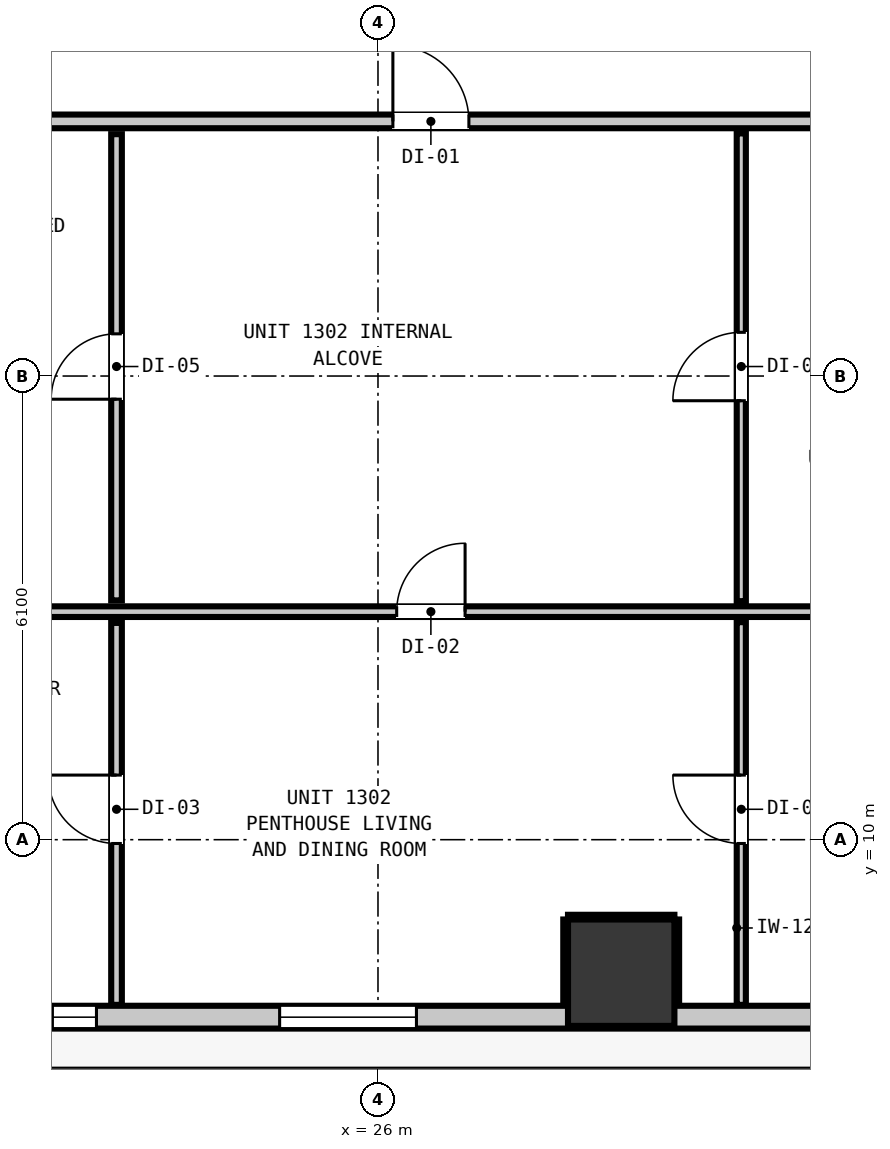
"""IFC4 building model, lengths in metres.
Left out: names, types, materials, properties, quantities, classifications, styles, units other than length and angle.
Written with IfcOpenShell. Run it as: python <this file> out.ifc"""

import sys

from ifc_helpers import new_model, si_unit, direction, frame, frame_2d, origin, origin_2d, place, context, subcontext, project, spatial, rectangle, extrude, element, fill, save


model = new_model("IFC4")
c1 = context("Model", 3, precision=1e-05, world=origin(), true_north=direction((0.0, 1.0)))
c2 = subcontext(c1, "Body", "Model", "MODEL_VIEW")
j1 = project(units=[si_unit("LENGTHUNIT", "METRE"), si_unit("PLANEANGLEUNIT", "RADIAN")], contexts=[c1])
p1 = place(None, origin())
s1 = spatial("IfcSite", under=j1, at=p1, CompositionType="ELEMENT")
p2 = place(p1, origin())
s2 = spatial("IfcBuilding", under=s1, at=p2, CompositionType="ELEMENT")
p3 = place(p2, frame((0.0, 0.0, 48.56)))
s3 = spatial("IfcBuildingStorey", under=s2, at=p3, CompositionType="ELEMENT", Elevation=48.56)
p4 = place(p3, frame((29.2, 8.25, 0.0), z_axis=(0.0, 0.0, 1.0), x_axis=(1.0, 0.0, 0.0)))
e1 = element("IfcColumn", 1, at=p4, inside=s3, PredefinedType="COLUMN", context=c2, shape_type="SweptSolid", body=[
    extrude(rectangle(XDim=1.4, YDim=1.4, at=origin_2d()), origin(), (0.0, 0.0, 1.0), 3.32),
])
p5 = place(p3, frame((47.835, 7.665, 0.0), z_axis=(0.0, 0.0, 1.0), x_axis=(-1.0, 0.0, 0.0)))
e2 = element("IfcWall", 2, at=p5, inside=s3, PredefinedType="STANDARD", context=c2, shape_type="SweptSolid", body=[
    extrude(rectangle(XDim=37.47, YDim=0.3, at=frame_2d((18.735, 0.0))), origin(), (0.0, 0.0, 1.0), 3.06),
])
p6 = place(p5, frame((2.301, 0.0, 0.0)))
e3 = element("IfcOpeningElement", 3, at=p6, cuts=e2, PredefinedType="OPENING", context=c2, shape_type="SweptSolid", body=[
    extrude(rectangle(XDim=1.0, YDim=2.15, at=frame_2d((0.5, 1.075))), frame((0.0, 0.16, 0.0), z_axis=(0.0, -1.0, 0.0), x_axis=(1.0, 0.0, 0.0)), (0.0, 0.0, 1.0), 0.32),
])
p7 = place(p5, frame((32.251, 0.0, 0.85)))
e4 = element("IfcOpeningElement", 4, at=p7, cuts=e2, PredefinedType="OPENING", context=c2, shape_type="SweptSolid", body=[
    extrude(rectangle(XDim=1.05, YDim=1.65, at=frame_2d((0.525, 0.825))), frame((0.0, 0.16, 0.0), z_axis=(0.0, -1.0, 0.0), x_axis=(1.0, 0.0, 0.0)), (0.0, 0.0, 1.0), 0.32),
])
p8 = place(p5, frame((21.329, 0.0, 0.85)))
e5 = element("IfcOpeningElement", 5, at=p8, cuts=e2, PredefinedType="OPENING", context=c2, shape_type="SweptSolid", body=[
    extrude(rectangle(XDim=1.8, YDim=1.9, at=frame_2d((0.9, 0.95))), frame((0.0, 0.16, 0.0), z_axis=(0.0, -1.0, 0.0), x_axis=(1.0, 0.0, 0.0)), (0.0, 0.0, 1.0), 0.32),
])
p9 = place(p5, frame((25.539, 0.0, 0.85)))
e6 = element("IfcOpeningElement", 6, at=p9, cuts=e2, PredefinedType="OPENING", context=c2, shape_type="SweptSolid", body=[
    extrude(rectangle(XDim=0.58, YDim=1.5, at=frame_2d((0.29, 0.75))), frame((0.0, 0.16, 0.0), z_axis=(0.0, -1.0, 0.0), x_axis=(1.0, 0.0, 0.0)), (0.0, 0.0, 1.0), 0.32),
])
p10 = place(p5, frame((14.135, 0.0, 0.85)))
e7 = element("IfcOpeningElement", 7, at=p10, cuts=e2, PredefinedType="OPENING", context=c2, shape_type="SweptSolid", body=[
    extrude(rectangle(XDim=1.8, YDim=1.9, at=frame_2d((0.9, 0.95))), frame((0.0, 0.16, 0.0), z_axis=(0.0, -1.0, 0.0), x_axis=(1.0, 0.0, 0.0)), (0.0, 0.0, 1.0), 0.32),
])
p11 = place(p5, frame((5.562, 0.0, 0.85)))
e8 = element("IfcOpeningElement", 8, at=p11, cuts=e2, PredefinedType="OPENING", context=c2, shape_type="SweptSolid", body=[
    extrude(rectangle(XDim=1.8, YDim=1.9, at=frame_2d((0.9, 0.95))), frame((0.0, 0.16, 0.0), z_axis=(0.0, -1.0, 0.0), x_axis=(1.0, 0.0, 0.0)), (0.0, 0.0, 1.0), 0.32),
])
p12 = place(p5, frame((9.839, 0.0, 0.85)))
e9 = element("IfcOpeningElement", 9, at=p12, cuts=e2, PredefinedType="OPENING", context=c2, shape_type="SweptSolid", body=[
    extrude(rectangle(XDim=0.58, YDim=1.5, at=frame_2d((0.29, 0.75))), frame((0.0, 0.16, 0.0), z_axis=(0.0, -1.0, 0.0), x_axis=(1.0, 0.0, 0.0)), (0.0, 0.0, 1.0), 0.32),
])
p13 = place(p5, frame((0.364, 0.0, 0.85)))
e10 = element("IfcOpeningElement", 10, at=p13, cuts=e2, PredefinedType="OPENING", context=c2, shape_type="SweptSolid", body=[
    extrude(rectangle(XDim=1.05, YDim=1.65, at=frame_2d((0.525, 0.825))), frame((0.0, 0.16, 0.0), z_axis=(0.0, -1.0, 0.0), x_axis=(1.0, 0.0, 0.0)), (0.0, 0.0, 1.0), 0.32),
])
p14 = place(p3, frame((8.027, 19.45, 0.0), z_axis=(0.0, 0.0, 1.0), x_axis=(1.0, 0.0, 0.0)))
e11 = element("IfcWall", 11, at=p14, inside=s3, PredefinedType="PARTITIONING", context=c2, shape_type="SweptSolid", body=[
    extrude(rectangle(XDim=42.146, YDim=0.18, at=frame_2d((21.073, 0.0))), origin(), (0.0, 0.0, 1.0), 3.06),
])
p15 = place(p14, frame((5.256, 0.0, 0.0)))
e12 = element("IfcOpeningElement", 12, at=p15, cuts=e11, PredefinedType="OPENING", context=c2, shape_type="SweptSolid", body=[
    extrude(rectangle(XDim=1.0, YDim=2.15, at=frame_2d((0.5, 1.075))), frame((0.0, 0.1, 0.0), z_axis=(0.0, -1.0, 0.0), x_axis=(1.0, 0.0, 0.0)), (0.0, 0.0, 1.0), 0.2),
])
p16 = place(p14, frame((18.169, 0.0, 0.0)))
e13 = element("IfcOpeningElement", 13, at=p16, cuts=e11, PredefinedType="OPENING", context=c2, shape_type="SweptSolid", body=[
    extrude(rectangle(XDim=1.0, YDim=2.15, at=frame_2d((0.5, 1.075))), frame((0.0, 0.1, 0.0), z_axis=(0.0, -1.0, 0.0), x_axis=(1.0, 0.0, 0.0)), (0.0, 0.0, 1.0), 0.2),
])
p17 = place(p14, frame((33.653, 0.0, 0.0)))
e14 = element("IfcOpeningElement", 14, at=p17, cuts=e11, PredefinedType="OPENING", context=c2, shape_type="SweptSolid", body=[
    extrude(rectangle(XDim=1.0, YDim=2.15, at=frame_2d((0.5, 1.075))), frame((0.0, 0.1, 0.0), z_axis=(0.0, -1.0, 0.0), x_axis=(1.0, 0.0, 0.0)), (0.0, 0.0, 1.0), 0.2),
])
p18 = place(p3, frame((19.12, 13.0, 0.0), z_axis=(0.0, 0.0, 1.0), x_axis=(1.0, 0.0, 0.0)))
e15 = element("IfcWall", 15, at=p18, inside=s3, PredefinedType="PARTITIONING", context=c2, shape_type="SweptSolid", body=[
    extrude(rectangle(XDim=31.053, YDim=0.14, at=frame_2d((15.526, 0.0))), origin(), (0.0, 0.0, 1.0), 3.06),
])
p19 = place(p18, frame((7.126, 0.0, 0.0)))
e16 = element("IfcOpeningElement", 16, at=p19, cuts=e15, PredefinedType="OPENING", context=c2, shape_type="SweptSolid", body=[
    extrude(rectangle(XDim=0.9, YDim=2.1, at=frame_2d((0.45, 1.05))), frame((0.0, 0.08, 0.0), z_axis=(0.0, -1.0, 0.0), x_axis=(1.0, 0.0, 0.0)), (0.0, 0.0, 1.0), 0.16),
])
p20 = place(p18, frame((22.609, 0.0, 0.0)))
e17 = element("IfcOpeningElement", 17, at=p20, cuts=e15, PredefinedType="OPENING", context=c2, shape_type="SweptSolid", body=[
    extrude(rectangle(XDim=0.9, YDim=2.1, at=frame_2d((0.45, 1.05))), frame((0.0, 0.08, 0.0), z_axis=(0.0, -1.0, 0.0), x_axis=(1.0, 0.0, 0.0)), (0.0, 0.0, 1.0), 0.16),
])
p21 = place(p3, frame((22.56, 7.827, 0.0), z_axis=(0.0, 0.0, 1.0), x_axis=(0.0, 1.0, 0.0)))
e18 = element("IfcWall", 18, at=p21, inside=s3, PredefinedType="PARTITIONING", context=c2, shape_type="SweptSolid", body=[
    extrude(rectangle(XDim=5.025, YDim=0.14, at=frame_2d((2.513, 0.0))), origin(), (0.0, 0.0, 1.0), 3.06),
])
p22 = place(p21, frame((2.123, 0.0, 0.0)))
e19 = element("IfcOpeningElement", 19, at=p22, cuts=e18, PredefinedType="OPENING", context=c2, shape_type="SweptSolid", body=[
    extrude(rectangle(XDim=0.9, YDim=2.1, at=frame_2d((0.45, 1.05))), frame((0.0, 0.08, 0.0), z_axis=(0.0, -1.0, 0.0), x_axis=(1.0, 0.0, 0.0)), (0.0, 0.0, 1.0), 0.16),
])
p23 = place(p3, frame((22.56, 13.148, 0.0), z_axis=(0.0, 0.0, 1.0), x_axis=(0.0, 1.0, 0.0)))
e20 = element("IfcWall", 20, at=p23, inside=s3, PredefinedType="PARTITIONING", context=c2, shape_type="SweptSolid", body=[
    extrude(rectangle(XDim=6.134, YDim=0.14, at=frame_2d((3.067, 0.0))), origin(), (0.0, 0.0, 1.0), 3.06),
])
p24 = place(p23, frame((2.647, 0.0, 0.0)))
e21 = element("IfcOpeningElement", 21, at=p24, cuts=e20, PredefinedType="OPENING", context=c2, shape_type="SweptSolid", body=[
    extrude(rectangle(XDim=0.86, YDim=2.02, at=frame_2d((0.43, 1.01))), frame((0.0, 0.08, 0.0), z_axis=(0.0, -1.0, 0.0), x_axis=(1.0, 0.0, 0.0)), (0.0, 0.0, 1.0), 0.16),
])
p25 = place(p3, frame((30.78, 7.827, 0.0), z_axis=(0.0, 0.0, 1.0), x_axis=(0.0, 1.0, 0.0)))
e22 = element("IfcWall", 22, at=p25, inside=s3, PredefinedType="PARTITIONING", context=c2, shape_type="SweptSolid", body=[
    extrude(rectangle(XDim=5.035, YDim=0.12, at=frame_2d((2.518, 0.0))), origin(), (0.0, 0.0, 1.0), 3.06),
])
p26 = place(p25, frame((2.123, 0.0, 0.0)))
e23 = element("IfcOpeningElement", 23, at=p26, cuts=e22, PredefinedType="OPENING", context=c2, shape_type="SweptSolid", body=[
    extrude(rectangle(XDim=0.9, YDim=2.1, at=frame_2d((0.45, 1.05))), frame((0.0, 0.07, 0.0), z_axis=(0.0, -1.0, 0.0), x_axis=(1.0, 0.0, 0.0)), (0.0, 0.0, 1.0), 0.14),
])
p27 = place(p3, frame((30.78, 13.138, 0.0), z_axis=(0.0, 0.0, 1.0), x_axis=(0.0, 1.0, 0.0)))
e24 = element("IfcWall", 24, at=p27, inside=s3, PredefinedType="PARTITIONING", context=c2, shape_type="SweptSolid", body=[
    extrude(rectangle(XDim=6.154, YDim=0.12, at=frame_2d((3.077, 0.0))), origin(), (0.0, 0.0, 1.0), 3.06),
])
p28 = place(p27, frame((2.637, 0.0, 0.0)))
e25 = element("IfcOpeningElement", 25, at=p28, cuts=e24, PredefinedType="OPENING", context=c2, shape_type="SweptSolid", body=[
    extrude(rectangle(XDim=0.9, YDim=2.1, at=frame_2d((0.45, 1.05))), frame((0.0, 0.07, 0.0), z_axis=(0.0, -1.0, 0.0), x_axis=(1.0, 0.0, 0.0)), (0.0, 0.0, 1.0), 0.14),
])
p29 = place(p3, frame((28.5, 8.982, 0.0), z_axis=(0.0, 0.0, 1.0), x_axis=(1.0, 0.0, 0.0)))
e26 = element("IfcWall", 26, at=p29, inside=s3, PredefinedType="PARTITIONING", context=c2, shape_type="SweptSolid", body=[
    extrude(rectangle(XDim=1.4, YDim=0.06, at=frame_2d((0.7, 0.0))), origin(), (0.0, 0.0, 1.0), 1.45),
])
for number, where, z_axis, x_axis in (
    (27, (28.468, 7.83, 0.0), (0.0, 0.0, 1.0), (0.0, 1.0, 0.0)),
    (28, (29.932, 7.83, 0.0), (0.0, 0.0, 1.0), (0.0, 1.0, 0.0)),
):
    element("IfcWall", number, at=place(p3, frame(where, z_axis=z_axis, x_axis=x_axis)), inside=s3, PredefinedType="PARTITIONING", context=c2, shape_type="SweptSolid", body=[
        extrude(rectangle(XDim=1.12, YDim=0.06, at=frame_2d((0.56, 0.0))), origin(), (0.0, 0.0, 1.0), 1.45),
    ])
p30 = place(p8, origin())
e29 = element("IfcWindow", 29, at=p30, inside=s3, PartitioningType="SINGLE_PANEL", PredefinedType="WINDOW", context=c2, shape_type="SweptSolid", body=[
    extrude(rectangle(XDim=1.8, YDim=1.9, at=frame_2d((0.9, 0.95))), frame((0.0, 0.03, 0.0), z_axis=(0.0, -1.0, 0.0), x_axis=(1.0, 0.0, 0.0)), (0.0, 0.0, 1.0), 0.06),
])
fill(e5, e29)
p31 = place(p9, origin())
e30 = element("IfcWindow", 30, at=p31, inside=s3, PartitioningType="SINGLE_PANEL", PredefinedType="WINDOW", context=c2, shape_type="SweptSolid", body=[
    extrude(rectangle(XDim=0.58, YDim=1.5, at=frame_2d((0.29, 0.75))), frame((0.0, 0.03, 0.0), z_axis=(0.0, -1.0, 0.0), x_axis=(1.0, 0.0, 0.0)), (0.0, 0.0, 1.0), 0.06),
])
fill(e6, e30)
p32 = place(p16, origin())
e31 = element("IfcDoor", 31, at=p32, inside=s3, OperationType="SINGLE_SWING_LEFT", PredefinedType="DOOR", context=c2, shape_type="SweptSolid", body=[
    extrude(rectangle(XDim=1.0, YDim=2.15, at=frame_2d((0.5, 1.075))), frame((0.0, 0.025, 0.0), z_axis=(0.0, -1.0, 0.0), x_axis=(1.0, 0.0, 0.0)), (0.0, 0.0, 1.0), 0.05),
])
fill(e13, e31)
p33 = place(p19, origin())
e32 = element("IfcDoor", 32, at=p33, inside=s3, OperationType="SINGLE_SWING_RIGHT", PredefinedType="DOOR", context=c2, shape_type="SweptSolid", body=[
    extrude(rectangle(XDim=0.9, YDim=2.1, at=frame_2d((0.45, 1.05))), frame((0.0, 0.025, 0.0), z_axis=(0.0, -1.0, 0.0), x_axis=(1.0, 0.0, 0.0)), (0.0, 0.0, 1.0), 0.05),
])
fill(e16, e32)
p34 = place(p24, origin())
e33 = element("IfcDoor", 33, at=p34, inside=s3, OperationType="SINGLE_SWING_LEFT", PredefinedType="DOOR", context=c2, shape_type="SweptSolid", body=[
    extrude(rectangle(XDim=0.86, YDim=2.02, at=frame_2d((0.43, 1.01))), frame((0.0, 0.025, 0.0), z_axis=(0.0, -1.0, 0.0), x_axis=(1.0, 0.0, 0.0)), (0.0, 0.0, 1.0), 0.05),
])
fill(e21, e33)
p35 = place(p22, origin())
e34 = element("IfcDoor", 34, at=p35, inside=s3, OperationType="SINGLE_SWING_RIGHT", PredefinedType="DOOR", context=c2, shape_type="SweptSolid", body=[
    extrude(rectangle(XDim=0.9, YDim=2.1, at=frame_2d((0.45, 1.05))), frame((0.0, 0.025, 0.0), z_axis=(0.0, -1.0, 0.0), x_axis=(1.0, 0.0, 0.0)), (0.0, 0.0, 1.0), 0.05),
])
fill(e19, e34)
p36 = place(p28, origin())
e35 = element("IfcDoor", 35, at=p36, inside=s3, OperationType="SINGLE_SWING_LEFT", PredefinedType="DOOR", context=c2, shape_type="SweptSolid", body=[
    extrude(rectangle(XDim=0.9, YDim=2.1, at=frame_2d((0.45, 1.05))), frame((0.0, 0.025, 0.0), z_axis=(0.0, -1.0, 0.0), x_axis=(1.0, 0.0, 0.0)), (0.0, 0.0, 1.0), 0.05),
])
fill(e25, e35)
p37 = place(p26, origin())
e36 = element("IfcDoor", 36, at=p37, inside=s3, OperationType="SINGLE_SWING_RIGHT", PredefinedType="DOOR", context=c2, shape_type="SweptSolid", body=[
    extrude(rectangle(XDim=0.9, YDim=2.1, at=frame_2d((0.45, 1.05))), frame((0.0, 0.025, 0.0), z_axis=(0.0, -1.0, 0.0), x_axis=(1.0, 0.0, 0.0)), (0.0, 0.0, 1.0), 0.05),
])
fill(e23, e36)
save(model, sys.argv[1])
